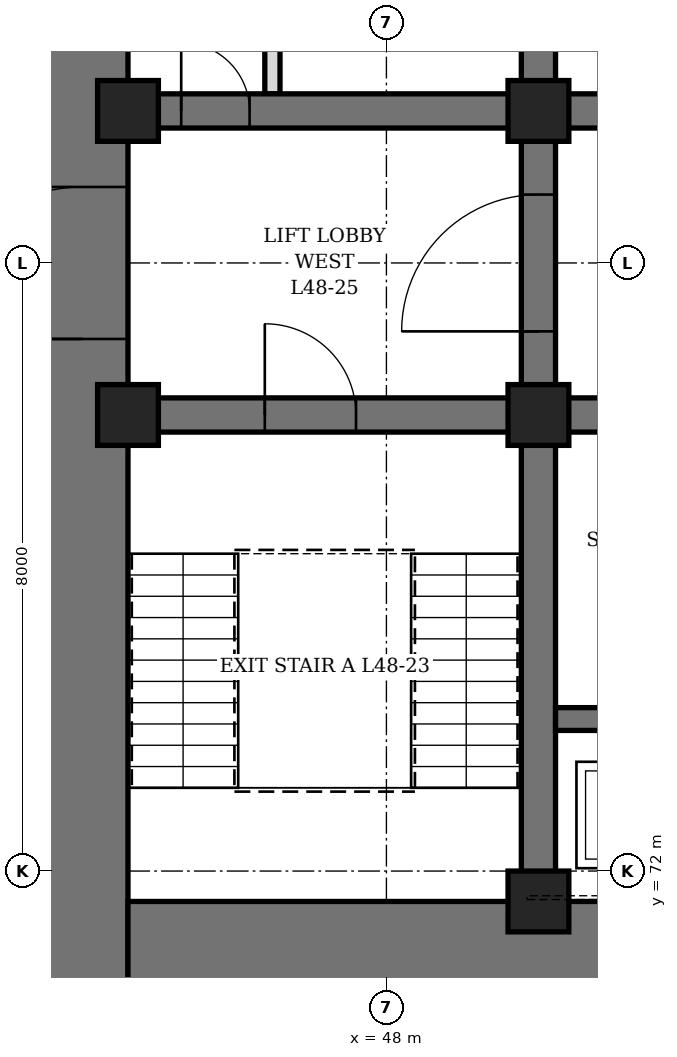
"""IFC4 building model, lengths in metres.
Left out: names, types, materials, properties, quantities, classifications, styles, units other than length and angle.
Written with IfcOpenShell. Run it as: python <this file> out.ifc"""

import sys

from ifc_helpers import new_model, si_unit, direction, frame, frame_2d, origin, origin_2d, place, context, subcontext, project, spatial, rectangle, hollow_rectangle, extrude, element, fill, save


model = new_model("IFC4")
c1 = context("Model", 3, precision=1e-05, world=origin(), true_north=direction((0.0, 1.0)))
c2 = subcontext(c1, "Body", "Model", "MODEL_VIEW")
j1 = project(units=[si_unit("LENGTHUNIT", "METRE"), si_unit("PLANEANGLEUNIT", "RADIAN")], contexts=[c1])
p1 = place(None, origin())
s1 = spatial("IfcSite", under=j1, at=p1, CompositionType="ELEMENT")
p2 = place(p1, origin())
s2 = spatial("IfcBuilding", under=s1, at=p2, CompositionType="ELEMENT")
p3 = place(p2, frame((0.0, 0.0, 214.9)))
s3 = spatial("IfcBuildingStorey", under=s2, at=p3, CompositionType="ELEMENT", Elevation=214.9)
p4 = place(p3, frame((44.0, 70.4, 0.0), z_axis=(0.0, 0.0, 1.0), x_axis=(0.0, 1.0, 0.0)))
e1 = element("IfcWall", 1, at=p4, inside=s3, PredefinedType="SHEAR", context=c2, shape_type="SweptSolid", body=[
    extrude(rectangle(XDim=19.2, YDim=1.2, at=frame_2d((9.6, 0.0))), origin(), (0.0, 0.0, 1.0), 4.2),
])
p5 = place(p4, frame((8.6, 0.0, 0.0)))
e2 = element("IfcOpeningElement", 2, at=p5, cuts=e1, PredefinedType="OPENING", context=c2, shape_type="SweptSolid", body=[
    extrude(rectangle(XDim=2.0, YDim=2.4, at=frame_2d((1.0, 1.2))), frame((0.0, 0.61, 0.0), z_axis=(0.0, -1.0, 0.0), x_axis=(1.0, 0.0, 0.0)), (0.0, 0.0, 1.0), 1.22),
])
p6 = place(p3, frame((44.6, 71.0, 0.0), z_axis=(0.0, 0.0, 1.0), x_axis=(1.0, 0.0, 0.0)))
e3 = element("IfcWall", 3, at=p6, inside=s3, PredefinedType="SHEAR", context=c2, shape_type="SweptSolid", body=[
    extrude(rectangle(XDim=22.8, YDim=1.2, at=frame_2d((11.4, 0.0))), origin(), (0.0, 0.0, 1.0), 4.2),
])
p7 = place(p6, frame((6.35, 0.0, 0.0)))
e4 = element("IfcOpeningElement", 4, at=p7, cuts=e3, PredefinedType="OPENING", context=c2, shape_type="SweptSolid", body=[
    extrude(rectangle(XDim=1.1, YDim=2.2, at=frame_2d((0.55, 1.1))), frame((0.0, 0.61, 0.0), z_axis=(0.0, -1.0, 0.0), x_axis=(1.0, 0.0, 0.0)), (0.0, 0.0, 1.0), 1.22),
])
p8 = place(p6, frame((9.35, 0.0, 0.0)))
e5 = element("IfcOpeningElement", 5, at=p8, cuts=e3, PredefinedType="OPENING", context=c2, shape_type="SweptSolid", body=[
    extrude(rectangle(XDim=1.1, YDim=2.2, at=frame_2d((0.55, 1.1))), frame((0.0, 0.61, 0.0), z_axis=(0.0, -1.0, 0.0), x_axis=(1.0, 0.0, 0.0)), (0.0, 0.0, 1.0), 1.22),
])
p9 = place(p6, frame((12.35, 0.0, 0.0)))
e6 = element("IfcOpeningElement", 6, at=p9, cuts=e3, PredefinedType="OPENING", context=c2, shape_type="SweptSolid", body=[
    extrude(rectangle(XDim=1.1, YDim=2.2, at=frame_2d((0.55, 1.1))), frame((0.0, 0.61, 0.0), z_axis=(0.0, -1.0, 0.0), x_axis=(1.0, 0.0, 0.0)), (0.0, 0.0, 1.0), 1.22),
])
p10 = place(p6, frame((15.35, 0.0, 0.0)))
e7 = element("IfcOpeningElement", 7, at=p10, cuts=e3, PredefinedType="OPENING", context=c2, shape_type="SweptSolid", body=[
    extrude(rectangle(XDim=1.1, YDim=2.2, at=frame_2d((0.55, 1.1))), frame((0.0, 0.61, 0.0), z_axis=(0.0, -1.0, 0.0), x_axis=(1.0, 0.0, 0.0)), (0.0, 0.0, 1.0), 1.22),
])
p11 = place(p3, frame((50.0, 71.6, 0.0), z_axis=(0.0, 0.0, 1.0), x_axis=(0.0, 1.0, 0.0)))
e8 = element("IfcWall", 8, at=p11, inside=s3, PredefinedType="SHEAR", context=c2, shape_type="SweptSolid", body=[
    extrude(rectangle(XDim=16.8, YDim=0.45, at=frame_2d((8.4, 0.0))), origin(), (0.0, 0.0, 1.0), 4.2),
])
p12 = place(p11, frame((7.5, 0.0, 0.0)))
e9 = element("IfcOpeningElement", 9, at=p12, cuts=e8, PredefinedType="OPENING", context=c2, shape_type="SweptSolid", body=[
    extrude(rectangle(XDim=1.8, YDim=2.4, at=frame_2d((0.9, 1.2))), frame((0.0, 0.235, 0.0), z_axis=(0.0, -1.0, 0.0), x_axis=(1.0, 0.0, 0.0)), (0.0, 0.0, 1.0), 0.47),
])
p13 = place(p3, frame((44.6, 78.0, 0.0), z_axis=(0.0, 0.0, 1.0), x_axis=(1.0, 0.0, 0.0)))
e10 = element("IfcWall", 10, at=p13, inside=s3, PredefinedType="SHEAR", context=c2, shape_type="SweptSolid", body=[
    extrude(rectangle(XDim=5.175, YDim=0.45, at=frame_2d((2.587, 0.0))), origin(), (0.0, 0.0, 1.0), 4.2),
])
p14 = place(p13, frame((1.8, 0.0, 0.0)))
e11 = element("IfcOpeningElement", 11, at=p14, cuts=e10, PredefinedType="OPENING", context=c2, shape_type="SweptSolid", body=[
    extrude(rectangle(XDim=1.2, YDim=2.1, at=frame_2d((0.6, 1.05))), frame((0.0, 0.235, 0.0), z_axis=(0.0, -1.0, 0.0), x_axis=(1.0, 0.0, 0.0)), (0.0, 0.0, 1.0), 0.47),
])
p15 = place(p3, frame((44.6, 82.0, 0.0), z_axis=(0.0, 0.0, 1.0), x_axis=(1.0, 0.0, 0.0)))
e12 = element("IfcWall", 12, at=p15, inside=s3, PredefinedType="SHEAR", context=c2, shape_type="SweptSolid", body=[
    extrude(rectangle(XDim=5.175, YDim=0.45, at=frame_2d((2.587, 0.0))), origin(), (0.0, 0.0, 1.0), 4.2),
])
p16 = place(p15, frame((0.7, 0.0, 0.0)))
e13 = element("IfcOpeningElement", 13, at=p16, cuts=e12, PredefinedType="OPENING", context=c2, shape_type="SweptSolid", body=[
    extrude(rectangle(XDim=0.9, YDim=2.1, at=frame_2d((0.45, 1.05))), frame((0.0, 0.235, 0.0), z_axis=(0.0, -1.0, 0.0), x_axis=(1.0, 0.0, 0.0)), (0.0, 0.0, 1.0), 0.47),
])
p17 = place(p3, frame((50.225, 78.0, 0.0), z_axis=(0.0, 0.0, 1.0), x_axis=(1.0, 0.0, 0.0)))
e14 = element("IfcWall", 14, at=p17, inside=s3, PredefinedType="SHEAR", context=c2, shape_type="SweptSolid", body=[
    extrude(rectangle(XDim=11.55, YDim=0.45, at=frame_2d((5.775, 0.0))), origin(), (0.0, 0.0, 1.0), 4.2),
])
p18 = place(p17, frame((0.825, 0.0, 0.0)))
e15 = element("IfcOpeningElement", 15, at=p18, cuts=e14, PredefinedType="OPENING", context=c2, shape_type="SweptSolid", body=[
    extrude(rectangle(XDim=0.9, YDim=2.1, at=frame_2d((0.45, 1.05))), frame((0.0, 0.235, 0.0), z_axis=(0.0, -1.0, 0.0), x_axis=(1.0, 0.0, 0.0)), (0.0, 0.0, 1.0), 0.47),
])
p19 = place(p17, frame((3.825, 0.0, 0.0)))
e16 = element("IfcOpeningElement", 16, at=p19, cuts=e14, PredefinedType="OPENING", context=c2, shape_type="SweptSolid", body=[
    extrude(rectangle(XDim=0.9, YDim=2.1, at=frame_2d((0.45, 1.05))), frame((0.0, 0.235, 0.0), z_axis=(0.0, -1.0, 0.0), x_axis=(1.0, 0.0, 0.0)), (0.0, 0.0, 1.0), 0.47),
])
p20 = place(p17, frame((6.825, 0.0, 0.0)))
e17 = element("IfcOpeningElement", 17, at=p20, cuts=e14, PredefinedType="OPENING", context=c2, shape_type="SweptSolid", body=[
    extrude(rectangle(XDim=0.9, YDim=2.1, at=frame_2d((0.45, 1.05))), frame((0.0, 0.235, 0.0), z_axis=(0.0, -1.0, 0.0), x_axis=(1.0, 0.0, 0.0)), (0.0, 0.0, 1.0), 0.47),
])
p21 = place(p17, frame((9.825, 0.0, 0.0)))
e18 = element("IfcOpeningElement", 18, at=p21, cuts=e14, PredefinedType="OPENING", context=c2, shape_type="SweptSolid", body=[
    extrude(rectangle(XDim=0.9, YDim=2.1, at=frame_2d((0.45, 1.05))), frame((0.0, 0.235, 0.0), z_axis=(0.0, -1.0, 0.0), x_axis=(1.0, 0.0, 0.0)), (0.0, 0.0, 1.0), 0.47),
])
p22 = place(p3, frame((50.225, 82.0, 0.0), z_axis=(0.0, 0.0, 1.0), x_axis=(1.0, 0.0, 0.0)))
e19 = element("IfcWall", 19, at=p22, inside=s3, PredefinedType="SHEAR", context=c2, shape_type="SweptSolid", body=[
    extrude(rectangle(XDim=11.55, YDim=0.45, at=frame_2d((5.775, 0.0))), origin(), (0.0, 0.0, 1.0), 4.2),
])
p23 = place(p22, frame((0.825, 0.0, 0.0)))
e20 = element("IfcOpeningElement", 20, at=p23, cuts=e19, PredefinedType="OPENING", context=c2, shape_type="SweptSolid", body=[
    extrude(rectangle(XDim=0.9, YDim=2.1, at=frame_2d((0.45, 1.05))), frame((0.0, 0.235, 0.0), z_axis=(0.0, -1.0, 0.0), x_axis=(1.0, 0.0, 0.0)), (0.0, 0.0, 1.0), 0.47),
])
p24 = place(p22, frame((3.825, 0.0, 0.0)))
e21 = element("IfcOpeningElement", 21, at=p24, cuts=e19, PredefinedType="OPENING", context=c2, shape_type="SweptSolid", body=[
    extrude(rectangle(XDim=0.9, YDim=2.1, at=frame_2d((0.45, 1.05))), frame((0.0, 0.235, 0.0), z_axis=(0.0, -1.0, 0.0), x_axis=(1.0, 0.0, 0.0)), (0.0, 0.0, 1.0), 0.47),
])
p25 = place(p22, frame((6.825, 0.0, 0.0)))
e22 = element("IfcOpeningElement", 22, at=p25, cuts=e19, PredefinedType="OPENING", context=c2, shape_type="SweptSolid", body=[
    extrude(rectangle(XDim=0.9, YDim=2.1, at=frame_2d((0.45, 1.05))), frame((0.0, 0.235, 0.0), z_axis=(0.0, -1.0, 0.0), x_axis=(1.0, 0.0, 0.0)), (0.0, 0.0, 1.0), 0.47),
])
p26 = place(p22, frame((9.825, 0.0, 0.0)))
e23 = element("IfcOpeningElement", 23, at=p26, cuts=e19, PredefinedType="OPENING", context=c2, shape_type="SweptSolid", body=[
    extrude(rectangle(XDim=0.9, YDim=2.1, at=frame_2d((0.45, 1.05))), frame((0.0, 0.235, 0.0), z_axis=(0.0, -1.0, 0.0), x_axis=(1.0, 0.0, 0.0)), (0.0, 0.0, 1.0), 0.47),
])
p27 = place(p3, frame((50.225, 74.0, 0.0), z_axis=(0.0, 0.0, 1.0), x_axis=(1.0, 0.0, 0.0)))
e24 = element("IfcWall", 24, at=p27, inside=s3, PredefinedType="SHEAR", context=c2, shape_type="SweptSolid", body=[
    extrude(rectangle(XDim=11.55, YDim=0.3, at=frame_2d((5.775, 0.0))), origin(), (0.0, 0.0, 1.0), 4.2),
])
for number, where, z_axis, x_axis in (
    (25, (44.6, 78.0, 0.0), (0.0, 0.0, 1.0), (1.0, 0.0, 0.0)),
    (26, (44.6, 82.0, 0.0), (0.0, 0.0, 1.0), (1.0, 0.0, 0.0)),
    (27, (50.0, 71.6, 0.0), (0.0, 0.0, 1.0), (1.0, 0.0, 0.0)),
    (28, (50.0, 78.0, 0.0), (0.0, 0.0, 1.0), (1.0, 0.0, 0.0)),
    (29, (50.0, 82.0, 0.0), (0.0, 0.0, 1.0), (1.0, 0.0, 0.0)),
):
    element("IfcColumn", number, at=place(p3, frame(where, z_axis=z_axis, x_axis=x_axis)), inside=s3, PredefinedType="COLUMN", context=c2, shape_type="SweptSolid", body=[
        extrude(hollow_rectangle(XDim=0.8, YDim=0.8, WallThickness=0.1, at=origin_2d()), origin(), (0.0, 0.0, 1.0), 4.2),
    ])
p28 = place(p3, frame((46.5, 82.225, 0.0), z_axis=(0.0, 0.0, 1.0), x_axis=(0.0, 1.0, 0.0)))
e30 = element("IfcWall", 30, at=p28, inside=s3, PredefinedType="PARTITIONING", context=c2, shape_type="SweptSolid", body=[
    extrude(rectangle(XDim=3.05, YDim=0.2, at=frame_2d((1.525, 0.0))), origin(), (0.0, 0.0, 1.0), 4.04),
])
p29 = place(p28, frame((1.075, 0.0, 0.0)))
e31 = element("IfcOpeningElement", 31, at=p29, cuts=e30, PredefinedType="OPENING", context=c2, shape_type="SweptSolid", body=[
    extrude(rectangle(XDim=0.9, YDim=2.1, at=frame_2d((0.45, 1.05))), frame((0.0, 0.11, 0.0), z_axis=(0.0, -1.0, 0.0), x_axis=(1.0, 0.0, 0.0)), (0.0, 0.0, 1.0), 0.22),
])
p30 = place(p16, origin())
e32 = element("IfcDoor", 32, at=p30, inside=s3, OperationType="SINGLE_SWING_LEFT", PredefinedType="DOOR", context=c2, shape_type="SweptSolid", body=[
    extrude(rectangle(XDim=0.9, YDim=2.1, at=frame_2d((0.45, 1.05))), frame((0.0, 0.225, 0.0), z_axis=(0.0, -1.0, 0.0), x_axis=(1.0, 0.0, 0.0)), (0.0, 0.0, 1.0), 0.449),
])
fill(e13, e32)
p31 = place(p14, origin())
e33 = element("IfcDoor", 33, at=p31, inside=s3, OperationType="SINGLE_SWING_LEFT", PredefinedType="DOOR", context=c2, shape_type="SweptSolid", body=[
    extrude(rectangle(XDim=1.2, YDim=2.1, at=frame_2d((0.6, 1.05))), frame((0.0, 0.225, 0.0), z_axis=(0.0, -1.0, 0.0), x_axis=(1.0, 0.0, 0.0)), (0.0, 0.0, 1.0), 0.449),
])
fill(e11, e33)
p32 = place(p5, origin())
e34 = element("IfcDoor", 34, at=p32, inside=s3, OperationType="DOUBLE_DOOR_SINGLE_SWING", PredefinedType="DOOR", context=c2, shape_type="SweptSolid", body=[
    extrude(rectangle(XDim=2.0, YDim=2.4, at=frame_2d((1.0, 1.2))), frame((0.0, 0.35, 0.0), z_axis=(0.0, -1.0, 0.0), x_axis=(1.0, 0.0, 0.0)), (0.0, 0.0, 1.0), 0.7),
])
fill(e2, e34)
p33 = place(p12, origin())
e35 = element("IfcDoor", 35, at=p33, inside=s3, OperationType="DOUBLE_DOOR_SINGLE_SWING", PredefinedType="DOOR", context=c2, shape_type="SweptSolid", body=[
    extrude(rectangle(XDim=1.8, YDim=2.4, at=frame_2d((0.9, 1.2))), frame((0.0, 0.225, 0.0), z_axis=(0.0, -1.0, 0.0), x_axis=(1.0, 0.0, 0.0)), (0.0, 0.0, 1.0), 0.449),
])
fill(e9, e35)
save(model, sys.argv[1])
